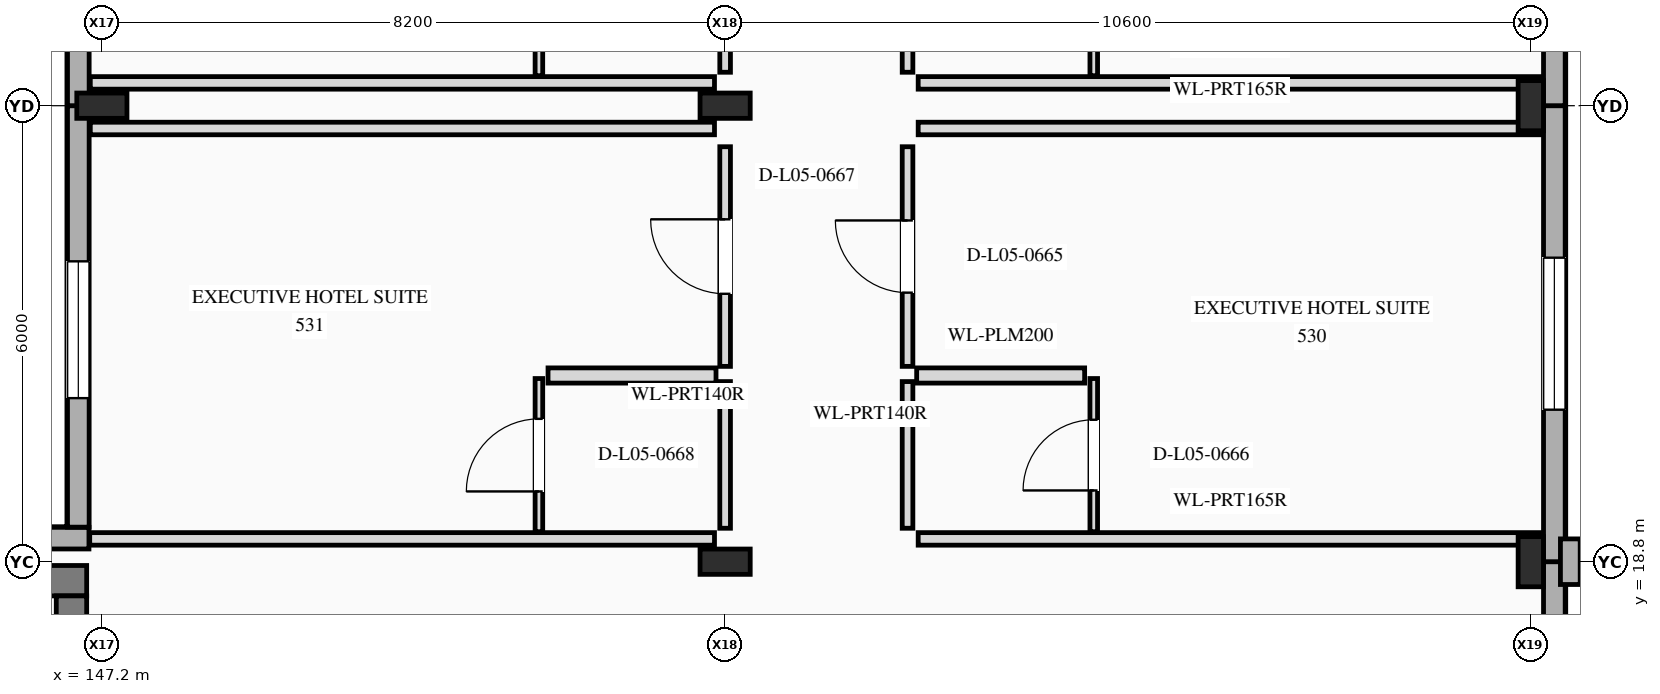
"""IFC4 building model, lengths in metres.
Left out: names, types, materials, properties, quantities, classifications, styles, units other than length and angle.
Written with IfcOpenShell. Run it as: python <this file> out.ifc"""

import sys

from ifc_helpers import new_model, si_unit, direction, frame, frame_2d, origin, origin_2d, place, context, subcontext, project, spatial, rectangle, i_section, extrude, element, fill, save


model = new_model("IFC4")
c1 = context("Model", 3, precision=1e-05, world=origin(), true_north=direction((0.0, 1.0)))
c2 = subcontext(c1, "Body", "Model", "MODEL_VIEW")
j1 = project(units=[si_unit("LENGTHUNIT", "METRE"), si_unit("PLANEANGLEUNIT", "RADIAN")], contexts=[c1])
p1 = place(None, origin())
s1 = spatial("IfcSite", under=j1, at=p1, CompositionType="ELEMENT")
p2 = place(p1, origin())
s2 = spatial("IfcBuilding", under=s1, at=p2, CompositionType="ELEMENT")
p3 = place(p2, frame((0.0, 0.0, 23.4)))
s3 = spatial("IfcBuildingStorey", under=s2, at=p3, CompositionType="ELEMENT", Elevation=23.4)
for number, where, z_axis, x_axis in (
    (1, (147.2, 24.8, 0.0), (0.0, 0.0, 1.0), (0.0, 1.0, 0.0)),
    (2, (155.4, 18.8, 0.0), (0.0, 0.0, 1.0), (0.0, 1.0, 0.0)),
    (3, (155.4, 24.8, 0.0), (0.0, 0.0, 1.0), (0.0, 1.0, 0.0)),
    (4, (166.0, 18.8, 0.0), (0.0, 0.0, 1.0), (1.0, 0.0, 0.0)),
    (5, (166.0, 24.8, 0.0), (0.0, 0.0, 1.0), (1.0, 0.0, 0.0)),
):
    element("IfcColumn", number, at=place(p3, frame(where, z_axis=z_axis, x_axis=x_axis)), inside=s3, PredefinedType="COLUMN", context=c2, shape_type="SweptSolid", body=[
        extrude(i_section(OverallWidth=0.333, OverallDepth=0.66, WebThickness=0.024, FlangeThickness=0.044, at=origin_2d()), origin(), (0.0, 0.0, 1.0), 3.6),
    ])
p4 = place(p3, frame((166.31, 8.2, 0.0), z_axis=(0.0, 0.0, 1.0), x_axis=(0.0, 1.0, 0.0)))
e6 = element("IfcWall", 6, at=p4, inside=s3, PredefinedType="STANDARD", context=c2, shape_type="SweptSolid", body=[
    extrude(rectangle(XDim=10.6, YDim=0.285, at=frame_2d((5.3, 0.0))), origin(), (0.0, 0.0, 1.0), 3.6),
])
p5 = place(p4, frame((4.55, 0.0, 0.88)))
e7 = element("IfcOpeningElement", 7, at=p5, cuts=e6, PredefinedType="OPENING", context=c2, shape_type="SweptSolid", body=[
    extrude(rectangle(XDim=1.5, YDim=1.7, at=frame_2d((0.75, 0.85))), frame((0.0, 0.152, 0.0), z_axis=(0.0, -1.0, 0.0), x_axis=(1.0, 0.0, 0.0)), (0.0, 0.0, 1.0), 0.305),
])
p6 = place(p3, frame((166.31, 18.8, 0.0), z_axis=(0.0, 0.0, 1.0), x_axis=(0.0, 1.0, 0.0)))
e8 = element("IfcWall", 8, at=p6, inside=s3, PredefinedType="STANDARD", context=c2, shape_type="SweptSolid", body=[
    extrude(rectangle(XDim=6.0, YDim=0.285, at=frame_2d((3.0, 0.0))), origin(), (0.0, 0.0, 1.0), 3.6),
])
p7 = place(p6, frame((2.0, 0.0, 0.85)))
e9 = element("IfcOpeningElement", 9, at=p7, cuts=e8, PredefinedType="OPENING", context=c2, shape_type="SweptSolid", body=[
    extrude(rectangle(XDim=2.0, YDim=1.65, at=frame_2d((1.0, 0.825))), frame((0.0, 0.152, 0.0), z_axis=(0.0, -1.0, 0.0), x_axis=(1.0, 0.0, 0.0)), (0.0, 0.0, 1.0), 0.305),
])
p8 = place(p3, frame((166.52, 18.5, 0.0), z_axis=(0.0, 0.0, 1.0), x_axis=(0.0, 1.0, 0.0)))
e10 = element("IfcWall", 10, at=p8, inside=s3, PredefinedType="ELEMENTEDWALL", context=c2, shape_type="SweptSolid", body=[
    extrude(rectangle(XDim=0.6, YDim=0.26, at=frame_2d((0.3, 0.0))), origin(), (0.0, 0.0, 1.0), 3.6),
])
p9 = place(p3, frame((166.31, 24.8, 0.0), z_axis=(0.0, 0.0, 1.0), x_axis=(0.0, 1.0, 0.0)))
e11 = element("IfcWall", 11, at=p9, inside=s3, PredefinedType="STANDARD", context=c2, shape_type="SweptSolid", body=[
    extrude(rectangle(XDim=1.34, YDim=0.285, at=frame_2d((0.67, 0.0))), origin(), (0.0, 0.0, 1.0), 3.6),
])
p10 = place(p3, frame((147.03, 19.11, 0.0), z_axis=(0.0, 0.0, 1.0), x_axis=(-1.0, 0.0, 0.0)))
e12 = element("IfcWall", 12, at=p10, inside=s3, PredefinedType="STANDARD", context=c2, shape_type="SweptSolid", body=[
    extrude(rectangle(XDim=11.03, YDim=0.285, at=frame_2d((5.515, 0.0))), origin(), (0.0, 0.0, 1.0), 3.6),
])
p11 = place(p3, frame((146.89, 19.254, 0.0), z_axis=(0.0, 0.0, 1.0), x_axis=(0.0, 1.0, 0.0)))
e13 = element("IfcWall", 13, at=p11, inside=s3, PredefinedType="STANDARD", context=c2, shape_type="SweptSolid", body=[
    extrude(rectangle(XDim=5.546, YDim=0.285, at=frame_2d((2.773, 0.0))), origin(), (0.0, 0.0, 1.0), 3.6),
])
p12 = place(p11, frame((1.698, 0.0, 0.85)))
e14 = element("IfcOpeningElement", 14, at=p12, cuts=e13, PredefinedType="OPENING", context=c2, shape_type="SweptSolid", body=[
    extrude(rectangle(XDim=1.8, YDim=1.8, at=frame_2d((0.9, 0.9))), frame((0.0, 0.152, 0.0), z_axis=(0.0, -1.0, 0.0), x_axis=(1.0, 0.0, 0.0)), (0.0, 0.0, 1.0), 0.305),
])
p13 = place(p3, frame((146.89, 24.8, 0.0), z_axis=(0.0, 0.0, 1.0), x_axis=(0.0, 1.0, 0.0)))
e15 = element("IfcWall", 15, at=p13, inside=s3, PredefinedType="STANDARD", context=c2, shape_type="SweptSolid", body=[
    extrude(rectangle(XDim=8.4, YDim=0.285, at=frame_2d((4.2, 0.0))), origin(), (0.0, 0.0, 1.0), 3.6),
])
p14 = place(p13, frame((3.225, 0.0, 0.85)))
e16 = element("IfcOpeningElement", 16, at=p14, cuts=e15, PredefinedType="OPENING", context=c2, shape_type="SweptSolid", body=[
    extrude(rectangle(XDim=1.95, YDim=1.85, at=frame_2d((0.975, 0.925))), frame((0.0, 0.152, 0.0), z_axis=(0.0, -1.0, 0.0), x_axis=(1.0, 0.0, 0.0)), (0.0, 0.0, 1.0), 0.305),
])
p15 = place(p3, frame((147.0, 18.55, 0.0), z_axis=(0.0, 0.0, 1.0), x_axis=(-1.0, 0.0, 0.0)))
e17 = element("IfcWall", 17, at=p15, inside=s3, PredefinedType="SHEAR", context=c2, shape_type="SweptSolid", body=[
    extrude(rectangle(XDim=10.6, YDim=0.4, at=frame_2d((5.3, 0.0))), origin(), (0.0, 0.0, 1.0), 3.6),
])
p16 = place(p3, frame((146.8, 11.0, 0.0), z_axis=(0.0, 0.0, 1.0), x_axis=(0.0, 1.0, 0.0)))
e18 = element("IfcWall", 18, at=p16, inside=s3, PredefinedType="SHEAR", context=c2, shape_type="SweptSolid", body=[
    extrude(rectangle(XDim=7.35, YDim=0.4, at=frame_2d((3.675, 0.0))), origin(), (0.0, 0.0, 1.0), 3.6),
])
p17 = place(p16, frame((5.0, 0.0, 0.0)))
e19 = element("IfcOpeningElement", 19, at=p17, cuts=e18, PredefinedType="OPENING", context=c2, shape_type="SweptSolid", body=[
    extrude(rectangle(XDim=0.95, YDim=2.2, at=frame_2d((0.475, 1.1))), frame((0.0, 0.21, 0.0), z_axis=(0.0, -1.0, 0.0), x_axis=(1.0, 0.0, 0.0)), (0.0, 0.0, 1.0), 0.42),
])
p18 = place(p16, frame((0.175, 0.0, 0.0)))
e20 = element("IfcOpeningElement", 20, at=p18, cuts=e18, PredefinedType="OPENING", context=c2, shape_type="SweptSolid", body=[
    extrude(rectangle(XDim=1.15, YDim=2.25, at=frame_2d((0.575, 1.125))), frame((0.0, 0.21, 0.0), z_axis=(0.0, -1.0, 0.0), x_axis=(1.0, 0.0, 0.0)), (0.0, 0.0, 1.0), 0.42),
])
p19 = place(p16, frame((1.875, 0.0, 0.0)))
e21 = element("IfcOpeningElement", 21, at=p19, cuts=e18, PredefinedType="OPENING", context=c2, shape_type="SweptSolid", body=[
    extrude(rectangle(XDim=1.15, YDim=2.25, at=frame_2d((0.575, 1.125))), frame((0.0, 0.21, 0.0), z_axis=(0.0, -1.0, 0.0), x_axis=(1.0, 0.0, 0.0)), (0.0, 0.0, 1.0), 0.42),
])
p20 = place(p3, frame((157.8, 19.24, 0.0), z_axis=(0.0, 0.0, 1.0), x_axis=(0.0, 1.0, 0.0)))
e22 = element("IfcWall", 22, at=p20, inside=s3, PredefinedType="PARTITIONING", context=c2, shape_type="SweptSolid", body=[
    extrude(rectangle(XDim=1.93, YDim=0.14, at=frame_2d((0.965, 0.0))), origin(), (0.0, 0.0, 1.0), 2.858),
])
p21 = place(p3, frame((157.8, 21.37, 0.0), z_axis=(0.0, 0.0, 1.0), x_axis=(0.0, 1.0, 0.0)))
e23 = element("IfcWall", 23, at=p21, inside=s3, PredefinedType="PARTITIONING", context=c2, shape_type="SweptSolid", body=[
    extrude(rectangle(XDim=2.89, YDim=0.14, at=frame_2d((1.445, 0.0))), origin(), (0.0, 0.0, 1.0), 2.858),
])
p22 = place(p21, frame((0.97, 0.0, 0.0)))
e24 = element("IfcOpeningElement", 24, at=p22, cuts=e23, PredefinedType="OPENING", context=c2, shape_type="SweptSolid", body=[
    extrude(rectangle(XDim=0.95, YDim=2.15, at=frame_2d((0.475, 1.075))), frame((0.0, 0.08, 0.0), z_axis=(0.0, -1.0, 0.0), x_axis=(1.0, 0.0, 0.0)), (0.0, 0.0, 1.0), 0.16),
])
for number, where, z_axis, x_axis in (
    (25, (157.94, 19.1, 0.0), (0.0, 0.0, 1.0), (1.0, 0.0, 0.0)),
    (26, (157.94, 24.5, 0.0), (0.0, 0.0, 1.0), (1.0, 0.0, 0.0)),
):
    element("IfcWall", number, at=place(p3, frame(where, z_axis=z_axis, x_axis=x_axis)), inside=s3, PredefinedType="PARTITIONING", context=c2, shape_type="SweptSolid", body=[
        extrude(rectangle(XDim=8.213, YDim=0.165, at=frame_2d((4.106, 0.0))), origin(), (0.0, 0.0, 1.0), 2.69),
    ])
p23 = place(p3, frame((157.92, 21.25, 0.0), z_axis=(0.0, 0.0, 1.0), x_axis=(1.0, 0.0, 0.0)))
e27 = element("IfcWall", 27, at=p23, inside=s3, PredefinedType="PLUMBINGWALL", context=c2, shape_type="SweptSolid", body=[
    extrude(rectangle(XDim=2.21, YDim=0.2, at=frame_2d((1.105, 0.0))), origin(), (0.0, 0.0, 1.0), 3.3),
])
p24 = place(p3, frame((160.25, 19.195, 0.0), z_axis=(0.0, 0.0, 1.0), x_axis=(0.0, 1.0, 0.0)))
e28 = element("IfcWall", 28, at=p24, inside=s3, PredefinedType="PARTITIONING", context=c2, shape_type="SweptSolid", body=[
    extrude(rectangle(XDim=2.015, YDim=0.1, at=frame_2d((1.008, 0.0))), origin(), (0.0, 0.0, 1.0), 2.858),
])
p25 = place(p24, frame((0.543, 0.0, 0.0)))
e29 = element("IfcOpeningElement", 29, at=p25, cuts=e28, PredefinedType="OPENING", context=c2, shape_type="SweptSolid", body=[
    extrude(rectangle(XDim=0.93, YDim=2.14, at=frame_2d((0.465, 1.07))), frame((0.0, 0.06, 0.0), z_axis=(0.0, -1.0, 0.0), x_axis=(1.0, 0.0, 0.0)), (0.0, 0.0, 1.0), 0.12),
])
p26 = place(p3, frame((155.4, 19.24, 0.0), z_axis=(0.0, 0.0, 1.0), x_axis=(0.0, 1.0, 0.0)))
e30 = element("IfcWall", 30, at=p26, inside=s3, PredefinedType="PARTITIONING", context=c2, shape_type="SweptSolid", body=[
    extrude(rectangle(XDim=1.93, YDim=0.14, at=frame_2d((0.965, 0.0))), origin(), (0.0, 0.0, 1.0), 2.774),
])
p27 = place(p3, frame((155.4, 21.37, 0.0), z_axis=(0.0, 0.0, 1.0), x_axis=(0.0, 1.0, 0.0)))
e31 = element("IfcWall", 31, at=p27, inside=s3, PredefinedType="PARTITIONING", context=c2, shape_type="SweptSolid", body=[
    extrude(rectangle(XDim=2.89, YDim=0.14, at=frame_2d((1.445, 0.0))), origin(), (0.0, 0.0, 1.0), 2.774),
])
p28 = place(p27, frame((0.955, 0.0, 0.0)))
e32 = element("IfcOpeningElement", 32, at=p28, cuts=e31, PredefinedType="OPENING", context=c2, shape_type="SweptSolid", body=[
    extrude(rectangle(XDim=0.98, YDim=2.2, at=frame_2d((0.49, 1.1))), frame((0.0, 0.08, 0.0), z_axis=(0.0, -1.0, 0.0), x_axis=(1.0, 0.0, 0.0)), (0.0, 0.0, 1.0), 0.16),
])
p29 = place(p3, frame((147.04, 19.1, 0.0), z_axis=(0.0, 0.0, 1.0), x_axis=(1.0, 0.0, 0.0)))
e33 = element("IfcWall", 33, at=p29, inside=s3, PredefinedType="PARTITIONING", context=c2, shape_type="SweptSolid", body=[
    extrude(rectangle(XDim=8.22, YDim=0.165, at=frame_2d((4.11, 0.0))), origin(), (0.0, 0.0, 1.0), 3.3),
])
p30 = place(p3, frame((147.048, 24.5, 0.0), z_axis=(0.0, 0.0, 1.0), x_axis=(1.0, 0.0, 0.0)))
e34 = element("IfcWall", 34, at=p30, inside=s3, PredefinedType="PARTITIONING", context=c2, shape_type="SweptSolid", body=[
    extrude(rectangle(XDim=8.212, YDim=0.165, at=frame_2d((4.106, 0.0))), origin(), (0.0, 0.0, 1.0), 2.713),
])
p31 = place(p3, frame((153.07, 21.25, 0.0), z_axis=(0.0, 0.0, 1.0), x_axis=(1.0, 0.0, 0.0)))
e35 = element("IfcWall", 35, at=p31, inside=s3, PredefinedType="PLUMBINGWALL", context=c2, shape_type="SweptSolid", body=[
    extrude(rectangle(XDim=2.21, YDim=0.2, at=frame_2d((1.105, 0.0))), origin(), (0.0, 0.0, 1.0), 3.3),
])
p32 = place(p3, frame((152.95, 19.195, 0.0), z_axis=(0.0, 0.0, 1.0), x_axis=(0.0, 1.0, 0.0)))
e36 = element("IfcWall", 36, at=p32, inside=s3, PredefinedType="PARTITIONING", context=c2, shape_type="SweptSolid", body=[
    extrude(rectangle(XDim=2.015, YDim=0.1, at=frame_2d((1.008, 0.0))), origin(), (0.0, 0.0, 1.0), 3.3),
])
p33 = place(p32, frame((0.53, 0.0, 0.0)))
e37 = element("IfcOpeningElement", 37, at=p33, cuts=e36, PredefinedType="OPENING", context=c2, shape_type="SweptSolid", body=[
    extrude(rectangle(XDim=0.955, YDim=2.14, at=frame_2d((0.478, 1.07))), frame((0.0, 0.06, 0.0), z_axis=(0.0, -1.0, 0.0), x_axis=(1.0, 0.0, 0.0)), (0.0, 0.0, 1.0), 0.12),
])
p34 = place(p3, frame((157.8, 25.24, 0.0), z_axis=(0.0, 0.0, 1.0), x_axis=(0.0, 1.0, 0.0)))
e38 = element("IfcWall", 38, at=p34, inside=s3, PredefinedType="PARTITIONING", context=c2, shape_type="SweptSolid", body=[
    extrude(rectangle(XDim=1.93, YDim=0.14, at=frame_2d((0.965, 0.0))), origin(), (0.0, 0.0, 1.0), 2.853),
])
p35 = place(p3, frame((157.94, 25.1, 0.0), z_axis=(0.0, 0.0, 1.0), x_axis=(1.0, 0.0, 0.0)))
e39 = element("IfcWall", 39, at=p35, inside=s3, PredefinedType="PARTITIONING", context=c2, shape_type="SweptSolid", body=[
    extrude(rectangle(XDim=8.213, YDim=0.165, at=frame_2d((4.106, 0.0))), origin(), (0.0, 0.0, 1.0), 2.69),
])
p36 = place(p3, frame((160.25, 25.195, 0.0), z_axis=(0.0, 0.0, 1.0), x_axis=(0.0, 1.0, 0.0)))
e40 = element("IfcWall", 40, at=p36, inside=s3, PredefinedType="PARTITIONING", context=c2, shape_type="SweptSolid", body=[
    extrude(rectangle(XDim=2.015, YDim=0.1, at=frame_2d((1.008, 0.0))), origin(), (0.0, 0.0, 1.0), 2.853),
])
p37 = place(p36, frame((0.568, 0.0, 0.0)))
e41 = element("IfcOpeningElement", 41, at=p37, cuts=e40, PredefinedType="OPENING", context=c2, shape_type="SweptSolid", body=[
    extrude(rectangle(XDim=0.88, YDim=2.18, at=frame_2d((0.44, 1.09))), frame((0.0, 0.06, 0.0), z_axis=(0.0, -1.0, 0.0), x_axis=(1.0, 0.0, 0.0)), (0.0, 0.0, 1.0), 0.12),
])
p38 = place(p3, frame((155.4, 25.24, 0.0), z_axis=(0.0, 0.0, 1.0), x_axis=(0.0, 1.0, 0.0)))
e42 = element("IfcWall", 42, at=p38, inside=s3, PredefinedType="PARTITIONING", context=c2, shape_type="SweptSolid", body=[
    extrude(rectangle(XDim=1.93, YDim=0.14, at=frame_2d((0.965, 0.0))), origin(), (0.0, 0.0, 1.0), 2.774),
])
p39 = place(p3, frame((147.048, 25.1, 0.0), z_axis=(0.0, 0.0, 1.0), x_axis=(1.0, 0.0, 0.0)))
e43 = element("IfcWall", 43, at=p39, inside=s3, PredefinedType="PARTITIONING", context=c2, shape_type="SweptSolid", body=[
    extrude(rectangle(XDim=8.212, YDim=0.165, at=frame_2d((4.106, 0.0))), origin(), (0.0, 0.0, 1.0), 2.713),
])
p40 = place(p3, frame((152.95, 25.195, 0.0), z_axis=(0.0, 0.0, 1.0), x_axis=(0.0, 1.0, 0.0)))
e44 = element("IfcWall", 44, at=p40, inside=s3, PredefinedType="PARTITIONING", context=c2, shape_type="SweptSolid", body=[
    extrude(rectangle(XDim=2.015, YDim=0.1, at=frame_2d((1.008, 0.0))), origin(), (0.0, 0.0, 1.0), 2.908),
])
p41 = place(p40, frame((0.555, 0.0, 0.0)))
e45 = element("IfcOpeningElement", 45, at=p41, cuts=e44, PredefinedType="OPENING", context=c2, shape_type="SweptSolid", body=[
    extrude(rectangle(XDim=0.905, YDim=2.18, at=frame_2d((0.453, 1.09))), frame((0.0, 0.06, 0.0), z_axis=(0.0, -1.0, 0.0), x_axis=(1.0, 0.0, 0.0)), (0.0, 0.0, 1.0), 0.12),
])
p42 = place(p7, origin())
e46 = element("IfcWindow", 46, at=p42, inside=s3, PartitioningType="SINGLE_PANEL", PredefinedType="WINDOW", context=c2, shape_type="SweptSolid", body=[
    extrude(rectangle(XDim=2.0, YDim=1.65, at=frame_2d((1.0, 0.825))), frame((0.0, 0.03, 0.0), z_axis=(0.0, -1.0, 0.0), x_axis=(1.0, 0.0, 0.0)), (0.0, 0.0, 1.0), 0.06),
])
fill(e9, e46)
p43 = place(p12, origin())
e47 = element("IfcWindow", 47, at=p43, inside=s3, PartitioningType="SINGLE_PANEL", PredefinedType="WINDOW", context=c2, shape_type="SweptSolid", body=[
    extrude(rectangle(XDim=1.8, YDim=1.8, at=frame_2d((0.9, 0.9))), frame((0.0, 0.03, 0.0), z_axis=(0.0, -1.0, 0.0), x_axis=(1.0, 0.0, 0.0)), (0.0, 0.0, 1.0), 0.06),
])
fill(e14, e47)
p44 = place(p22, origin())
e48 = element("IfcDoor", 48, at=p44, inside=s3, OperationType="SINGLE_SWING_RIGHT", PredefinedType="DOOR", context=c2, shape_type="SweptSolid", body=[
    extrude(rectangle(XDim=0.95, YDim=2.15, at=frame_2d((0.475, 1.075))), frame((0.0, 0.025, 0.0), z_axis=(0.0, -1.0, 0.0), x_axis=(1.0, 0.0, 0.0)), (0.0, 0.0, 1.0), 0.05),
])
fill(e24, e48)
p45 = place(p25, origin())
e49 = element("IfcDoor", 49, at=p45, inside=s3, OperationType="SINGLE_SWING_LEFT", PredefinedType="DOOR", context=c2, shape_type="SweptSolid", body=[
    extrude(rectangle(XDim=0.93, YDim=2.14, at=frame_2d((0.465, 1.07))), frame((0.0, 0.025, 0.0), z_axis=(0.0, -1.0, 0.0), x_axis=(1.0, 0.0, 0.0)), (0.0, 0.0, 1.0), 0.05),
])
fill(e29, e49)
p46 = place(p28, origin())
e50 = element("IfcDoor", 50, at=p46, inside=s3, OperationType="SINGLE_SWING_RIGHT", PredefinedType="DOOR", context=c2, shape_type="SweptSolid", body=[
    extrude(rectangle(XDim=0.98, YDim=2.2, at=frame_2d((0.49, 1.1))), frame((0.0, 0.025, 0.0), z_axis=(0.0, -1.0, 0.0), x_axis=(1.0, 0.0, 0.0)), (0.0, 0.0, 1.0), 0.05),
])
fill(e32, e50)
p47 = place(p33, origin())
e51 = element("IfcDoor", 51, at=p47, inside=s3, OperationType="SINGLE_SWING_LEFT", PredefinedType="DOOR", context=c2, shape_type="SweptSolid", body=[
    extrude(rectangle(XDim=0.955, YDim=2.14, at=frame_2d((0.478, 1.07))), frame((0.0, 0.025, 0.0), z_axis=(0.0, -1.0, 0.0), x_axis=(1.0, 0.0, 0.0)), (0.0, 0.0, 1.0), 0.05),
])
fill(e37, e51)
save(model, sys.argv[1])
